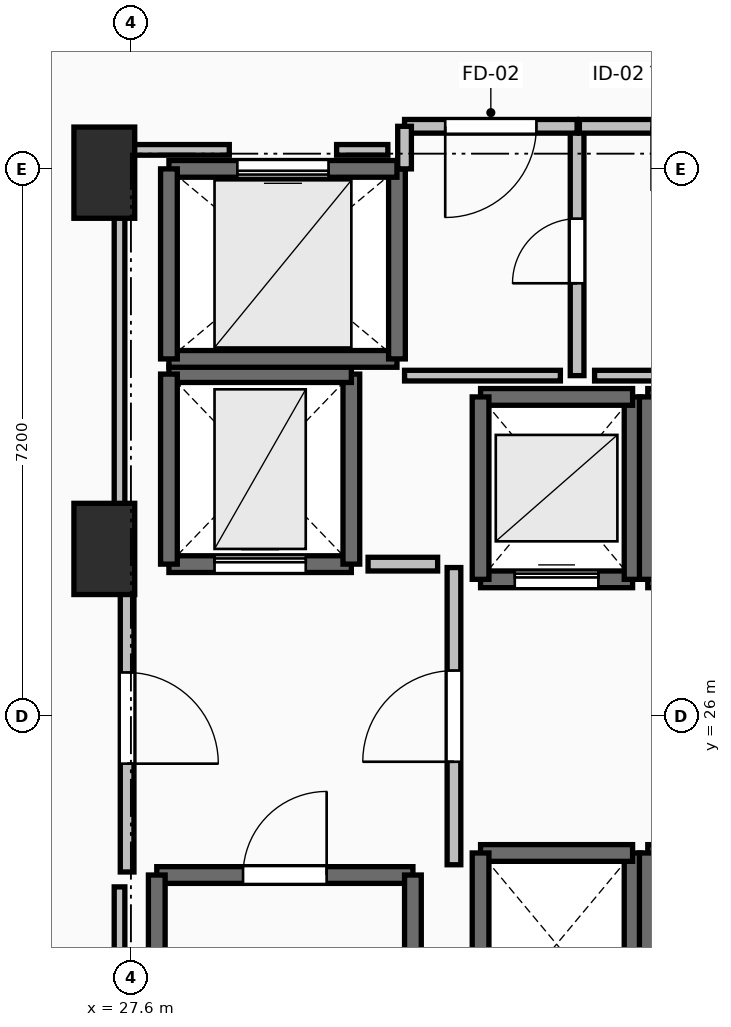
"""IFC4 building model, lengths in metres.
Left out: names, types, materials, properties, quantities, classifications, styles, units other than length and angle.
Written with IfcOpenShell. Run it as: python <this file> out.ifc"""

import sys

from ifc_helpers import new_model, si_unit, direction, frame, frame_2d, origin, origin_2d, place, context, subcontext, project, spatial, rectangle, extrude, element, fill, save


model = new_model("IFC4")
c1 = context("Model", 3, precision=1e-05, world=origin(), true_north=direction((0.0, 1.0)))
c2 = subcontext(c1, "Body", "Model", "MODEL_VIEW")
j1 = project(units=[si_unit("LENGTHUNIT", "METRE"), si_unit("PLANEANGLEUNIT", "RADIAN")], contexts=[c1])
p1 = place(None, origin())
s1 = spatial("IfcSite", under=j1, at=p1, CompositionType="ELEMENT")
p2 = place(p1, origin())
s2 = spatial("IfcBuilding", under=s1, at=p2, CompositionType="ELEMENT")
p3 = place(p2, frame((0.0, 0.0, 78.8)))
s3 = spatial("IfcBuildingStorey", under=s2, at=p3, CompositionType="ELEMENT", Elevation=78.8)
for number, where, z_axis, x_axis in (
    (1, (27.25, 28.2, 0.0), (0.0, 0.0, 1.0), (1.0, 0.0, 0.0)),
    (2, (27.25, 33.15, 0.0), (0.0, 0.0, 1.0), (1.0, 0.0, 0.0)),
):
    element("IfcColumn", number, at=place(p3, frame(where, z_axis=z_axis, x_axis=x_axis)), inside=s3, PredefinedType="PILASTER", context=c2, shape_type="SweptSolid", body=[
        extrude(rectangle(XDim=0.8, YDim=1.2, at=origin_2d()), origin(), (0.0, 0.0, 1.0), 3.5),
    ])
p4 = place(p3, frame((27.94, 23.91, 0.0), z_axis=(0.0, 0.0, 1.0), x_axis=(1.0, 0.0, 0.0)))
e3 = element("IfcWall", 3, at=p4, inside=s3, PredefinedType="SOLIDWALL", context=c2, shape_type="SweptSolid", body=[
    extrude(rectangle(XDim=3.37, YDim=0.22, at=frame_2d((1.685, 0.0))), origin(), (0.0, 0.0, 1.0), 3.24),
])
p5 = place(p4, frame((1.135, 0.0, 0.0)))
e4 = element("IfcOpeningElement", 4, at=p5, cuts=e3, PredefinedType="OPENING", context=c2, shape_type="SweptSolid", body=[
    extrude(rectangle(XDim=1.1, YDim=2.15, at=frame_2d((0.55, 1.075))), frame((0.0, 0.125, 0.0), z_axis=(0.0, -1.0, 0.0), x_axis=(1.0, 0.0, 0.0)), (0.0, 0.0, 1.0), 0.25),
])
for number, where, z_axis, x_axis in (
    (5, (31.31, 23.91, 0.0), (0.0, 0.0, 1.0), (0.0, -1.0, 0.0)),
    (6, (27.94, 16.49, 0.0), (0.0, 0.0, 1.0), (0.0, 1.0, 0.0)),
):
    element("IfcWall", number, at=place(p3, frame(where, z_axis=z_axis, x_axis=x_axis)), inside=s3, PredefinedType="SOLIDWALL", context=c2, shape_type="SweptSolid", body=[
        extrude(rectangle(XDim=7.42, YDim=0.22, at=frame_2d((3.71, 0.0))), origin(), (0.0, 0.0, 1.0), 3.24),
    ])
p6 = place(p3, frame((32.2, 27.8, 0.0), z_axis=(0.0, 0.0, 1.0), x_axis=(1.0, 0.0, 0.0)))
e7 = element("IfcWall", 7, at=p6, inside=s3, PredefinedType="SOLIDWALL", context=c2, shape_type="SweptSolid", body=[
    extrude(rectangle(XDim=2.0, YDim=0.22, at=frame_2d((1.0, 0.0))), origin(), (0.0, 0.0, 1.0), 3.24),
])
p7 = place(p6, frame((0.45, 0.0, 0.0)))
e8 = element("IfcOpeningElement", 8, at=p7, cuts=e7, PredefinedType="OPENING", context=c2, shape_type="SweptSolid", body=[
    extrude(rectangle(XDim=1.1, YDim=2.2, at=frame_2d((0.55, 1.1))), frame((0.0, 0.125, 0.0), z_axis=(0.0, -1.0, 0.0), x_axis=(1.0, 0.0, 0.0)), (0.0, 0.0, 1.0), 0.25),
])
p8 = place(p3, frame((34.2, 27.8, 0.0), z_axis=(0.0, 0.0, 1.0), x_axis=(0.0, 1.0, 0.0)))
e9 = element("IfcWall", 9, at=p8, inside=s3, PredefinedType="SOLIDWALL", context=c2, shape_type="SweptSolid", body=[
    extrude(rectangle(XDim=2.4, YDim=0.22, at=frame_2d((1.2, 0.0))), origin(), (0.0, 0.0, 1.0), 3.24),
])
p9 = place(p3, frame((34.2, 30.2, 0.0), z_axis=(0.0, 0.0, 1.0), x_axis=(-1.0, 0.0, 0.0)))
e10 = element("IfcWall", 10, at=p9, inside=s3, PredefinedType="SOLIDWALL", context=c2, shape_type="SweptSolid", body=[
    extrude(rectangle(XDim=2.0, YDim=0.22, at=frame_2d((1.0, 0.0))), origin(), (0.0, 0.0, 1.0), 3.24),
])
p10 = place(p3, frame((32.2, 30.2, 0.0), z_axis=(0.0, 0.0, 1.0), x_axis=(0.0, -1.0, 0.0)))
e11 = element("IfcWall", 11, at=p10, inside=s3, PredefinedType="SOLIDWALL", context=c2, shape_type="SweptSolid", body=[
    extrude(rectangle(XDim=2.4, YDim=0.22, at=frame_2d((1.2, 0.0))), origin(), (0.0, 0.0, 1.0), 3.24),
])
p11 = place(p3, frame((34.4, 27.8, 0.0), z_axis=(0.0, 0.0, 1.0), x_axis=(1.0, 0.0, 0.0)))
e12 = element("IfcWall", 12, at=p11, inside=s3, PredefinedType="SOLIDWALL", context=c2, shape_type="SweptSolid", body=[
    extrude(rectangle(XDim=2.0, YDim=0.22, at=frame_2d((1.0, 0.0))), origin(), (0.0, 0.0, 1.0), 3.24),
])
p12 = place(p11, frame((0.45, 0.0, 0.0)))
e13 = element("IfcOpeningElement", 13, at=p12, cuts=e12, PredefinedType="OPENING", context=c2, shape_type="SweptSolid", body=[
    extrude(rectangle(XDim=1.1, YDim=2.2, at=frame_2d((0.55, 1.1))), frame((0.0, 0.125, 0.0), z_axis=(0.0, -1.0, 0.0), x_axis=(1.0, 0.0, 0.0)), (0.0, 0.0, 1.0), 0.25),
])
p13 = place(p3, frame((36.4, 30.2, 0.0), z_axis=(0.0, 0.0, 1.0), x_axis=(-1.0, 0.0, 0.0)))
e14 = element("IfcWall", 14, at=p13, inside=s3, PredefinedType="SOLIDWALL", context=c2, shape_type="SweptSolid", body=[
    extrude(rectangle(XDim=2.0, YDim=0.22, at=frame_2d((1.0, 0.0))), origin(), (0.0, 0.0, 1.0), 3.24),
])
for number, where, z_axis, x_axis in (
    (15, (34.4, 30.2, 0.0), (0.0, 0.0, 1.0), (0.0, -1.0, 0.0)),
    (16, (34.2, 21.8, 0.0), (0.0, 0.0, 1.0), (0.0, 1.0, 0.0)),
):
    element("IfcWall", number, at=place(p3, frame(where, z_axis=z_axis, x_axis=x_axis)), inside=s3, PredefinedType="SOLIDWALL", context=c2, shape_type="SweptSolid", body=[
        extrude(rectangle(XDim=2.4, YDim=0.22, at=frame_2d((1.2, 0.0))), origin(), (0.0, 0.0, 1.0), 3.24),
    ])
p14 = place(p3, frame((34.2, 24.2, 0.0), z_axis=(0.0, 0.0, 1.0), x_axis=(-1.0, 0.0, 0.0)))
e17 = element("IfcWall", 17, at=p14, inside=s3, PredefinedType="SOLIDWALL", context=c2, shape_type="SweptSolid", body=[
    extrude(rectangle(XDim=2.0, YDim=0.22, at=frame_2d((1.0, 0.0))), origin(), (0.0, 0.0, 1.0), 3.24),
])
p15 = place(p3, frame((32.2, 24.2, 0.0), z_axis=(0.0, 0.0, 1.0), x_axis=(0.0, -1.0, 0.0)))
e18 = element("IfcWall", 18, at=p15, inside=s3, PredefinedType="SOLIDWALL", context=c2, shape_type="SweptSolid", body=[
    extrude(rectangle(XDim=2.4, YDim=0.22, at=frame_2d((1.2, 0.0))), origin(), (0.0, 0.0, 1.0), 3.24),
])
p16 = place(p3, frame((36.4, 24.2, 0.0), z_axis=(0.0, 0.0, 1.0), x_axis=(-1.0, 0.0, 0.0)))
e19 = element("IfcWall", 19, at=p16, inside=s3, PredefinedType="SOLIDWALL", context=c2, shape_type="SweptSolid", body=[
    extrude(rectangle(XDim=2.0, YDim=0.22, at=frame_2d((1.0, 0.0))), origin(), (0.0, 0.0, 1.0), 3.24),
])
p17 = place(p3, frame((34.4, 24.2, 0.0), z_axis=(0.0, 0.0, 1.0), x_axis=(0.0, -1.0, 0.0)))
e20 = element("IfcWall", 20, at=p17, inside=s3, PredefinedType="SOLIDWALL", context=c2, shape_type="SweptSolid", body=[
    extrude(rectangle(XDim=2.4, YDim=0.22, at=frame_2d((1.2, 0.0))), origin(), (0.0, 0.0, 1.0), 3.24),
])
p18 = place(p3, frame((28.1, 28.0, 0.0), z_axis=(0.0, 0.0, 1.0), x_axis=(1.0, 0.0, 0.0)))
e21 = element("IfcWall", 21, at=p18, inside=s3, PredefinedType="SHEAR", context=c2, shape_type="SweptSolid", body=[
    extrude(rectangle(XDim=2.4, YDim=0.22, at=frame_2d((1.2, 0.0))), origin(), (0.0, 0.0, 1.0), 3.24),
])
p19 = place(p18, frame((0.6, 0.0, 0.0)))
e22 = element("IfcOpeningElement", 22, at=p19, cuts=e21, PredefinedType="OPENING", context=c2, shape_type="SweptSolid", body=[
    extrude(rectangle(XDim=1.2, YDim=2.2, at=frame_2d((0.6, 1.1))), frame((0.0, 0.125, 0.0), z_axis=(0.0, -1.0, 0.0), x_axis=(1.0, 0.0, 0.0)), (0.0, 0.0, 1.0), 0.25),
])
p20 = place(p3, frame((30.5, 28.0, 0.0), z_axis=(0.0, 0.0, 1.0), x_axis=(0.0, 1.0, 0.0)))
e23 = element("IfcWall", 23, at=p20, inside=s3, PredefinedType="SHEAR", context=c2, shape_type="SweptSolid", body=[
    extrude(rectangle(XDim=2.5, YDim=0.22, at=frame_2d((1.25, 0.0))), origin(), (0.0, 0.0, 1.0), 3.24),
])
p21 = place(p3, frame((30.5, 30.5, 0.0), z_axis=(0.0, 0.0, 1.0), x_axis=(-1.0, 0.0, 0.0)))
e24 = element("IfcWall", 24, at=p21, inside=s3, PredefinedType="SHEAR", context=c2, shape_type="SweptSolid", body=[
    extrude(rectangle(XDim=2.4, YDim=0.22, at=frame_2d((1.2, 0.0))), origin(), (0.0, 0.0, 1.0), 3.24),
])
p22 = place(p3, frame((28.1, 30.5, 0.0), z_axis=(0.0, 0.0, 1.0), x_axis=(0.0, -1.0, 0.0)))
e25 = element("IfcWall", 25, at=p22, inside=s3, PredefinedType="SHEAR", context=c2, shape_type="SweptSolid", body=[
    extrude(rectangle(XDim=2.5, YDim=0.22, at=frame_2d((1.25, 0.0))), origin(), (0.0, 0.0, 1.0), 3.24),
])
p23 = place(p3, frame((28.1, 30.7, 0.0), z_axis=(0.0, 0.0, 1.0), x_axis=(1.0, 0.0, 0.0)))
e26 = element("IfcWall", 26, at=p23, inside=s3, PredefinedType="SOLIDWALL", context=c2, shape_type="SweptSolid", body=[
    extrude(rectangle(XDim=3.0, YDim=0.22, at=frame_2d((1.5, 0.0))), origin(), (0.0, 0.0, 1.0), 3.24),
])
p24 = place(p3, frame((31.1, 30.7, 0.0), z_axis=(0.0, 0.0, 1.0), x_axis=(0.0, 1.0, 0.0)))
e27 = element("IfcWall", 27, at=p24, inside=s3, PredefinedType="SOLIDWALL", context=c2, shape_type="SweptSolid", body=[
    extrude(rectangle(XDim=2.5, YDim=0.22, at=frame_2d((1.25, 0.0))), origin(), (0.0, 0.0, 1.0), 3.24),
])
p25 = place(p3, frame((31.1, 33.2, 0.0), z_axis=(0.0, 0.0, 1.0), x_axis=(-1.0, 0.0, 0.0)))
e28 = element("IfcWall", 28, at=p25, inside=s3, PredefinedType="SOLIDWALL", context=c2, shape_type="SweptSolid", body=[
    extrude(rectangle(XDim=3.0, YDim=0.22, at=frame_2d((1.5, 0.0))), origin(), (0.0, 0.0, 1.0), 3.24),
])
p26 = place(p25, frame((0.9, 0.0, 0.0)))
e29 = element("IfcOpeningElement", 29, at=p26, cuts=e28, PredefinedType="OPENING", context=c2, shape_type="SweptSolid", body=[
    extrude(rectangle(XDim=1.2, YDim=2.2, at=frame_2d((0.6, 1.1))), frame((0.0, 0.125, 0.0), z_axis=(0.0, -1.0, 0.0), x_axis=(1.0, 0.0, 0.0)), (0.0, 0.0, 1.0), 0.25),
])
p27 = place(p3, frame((28.1, 33.2, 0.0), z_axis=(0.0, 0.0, 1.0), x_axis=(0.0, -1.0, 0.0)))
e30 = element("IfcWall", 30, at=p27, inside=s3, PredefinedType="SOLIDWALL", context=c2, shape_type="SweptSolid", body=[
    extrude(rectangle(XDim=2.5, YDim=0.22, at=frame_2d((1.25, 0.0))), origin(), (0.0, 0.0, 1.0), 3.24),
])
p28 = place(p3, frame((31.85, 24.045, 0.0), z_axis=(0.0, 0.0, 1.0), x_axis=(0.0, 1.0, 0.0)))
e31 = element("IfcWall", 31, at=p28, inside=s3, PredefinedType="PARTITIONING", context=c2, shape_type="SweptSolid", body=[
    extrude(rectangle(XDim=3.91, YDim=0.18, at=frame_2d((1.955, 0.0))), origin(), (0.0, 0.0, 1.0), 3.24),
])
p29 = place(p28, frame((1.355, 0.0, 0.0)))
e32 = element("IfcOpeningElement", 32, at=p29, cuts=e31, PredefinedType="OPENING", context=c2, shape_type="SweptSolid", body=[
    extrude(rectangle(XDim=1.2, YDim=2.15, at=frame_2d((0.6, 1.075))), frame((0.0, 0.105, 0.0), z_axis=(0.0, -1.0, 0.0), x_axis=(1.0, 0.0, 0.0)), (0.0, 0.0, 1.0), 0.21),
])
p30 = place(p3, frame((27.55, 28.0, 0.0), z_axis=(0.0, 0.0, 1.0), x_axis=(0.0, -1.0, 0.0)))
e33 = element("IfcWall", 33, at=p30, inside=s3, PredefinedType="PARTITIONING", context=c2, shape_type="SweptSolid", body=[
    extrude(rectangle(XDim=4.05, YDim=0.18, at=frame_2d((2.025, 0.0))), origin(), (0.0, 0.0, 1.0), 3.24),
])
p31 = place(p30, frame((1.425, 0.0, 0.0)))
e34 = element("IfcOpeningElement", 34, at=p31, cuts=e33, PredefinedType="OPENING", context=c2, shape_type="SweptSolid", body=[
    extrude(rectangle(XDim=1.2, YDim=2.15, at=frame_2d((0.6, 1.075))), frame((0.0, 0.105, 0.0), z_axis=(0.0, -1.0, 0.0), x_axis=(1.0, 0.0, 0.0)), (0.0, 0.0, 1.0), 0.21),
])
p32 = place(p3, frame((33.47, 30.48, 0.0), z_axis=(0.0, 0.0, 1.0), x_axis=(0.0, 1.0, 0.0)))
e35 = element("IfcWall", 35, at=p32, inside=s3, PredefinedType="PARTITIONING", context=c2, shape_type="SweptSolid", body=[
    extrude(rectangle(XDim=3.28, YDim=0.18, at=frame_2d((1.64, 0.0))), origin(), (0.0, 0.0, 1.0), 3.24),
])
p33 = place(p32, frame((1.215, 0.0, 0.0)))
e36 = element("IfcOpeningElement", 36, at=p33, cuts=e35, PredefinedType="OPENING", context=c2, shape_type="SweptSolid", body=[
    extrude(rectangle(XDim=0.85, YDim=2.1, at=frame_2d((0.425, 1.05))), frame((0.0, 0.105, 0.0), z_axis=(0.0, -1.0, 0.0), x_axis=(1.0, 0.0, 0.0)), (0.0, 0.0, 1.0), 0.21),
])
p34 = place(p3, frame((33.47, 33.76, 0.0), z_axis=(0.0, 0.0, 1.0), x_axis=(-1.0, 0.0, 0.0)))
e37 = element("IfcWall", 37, at=p34, inside=s3, PredefinedType="PARTITIONING", context=c2, shape_type="SweptSolid", body=[
    extrude(rectangle(XDim=2.27, YDim=0.18, at=frame_2d((1.135, 0.0))), origin(), (0.0, 0.0, 1.0), 3.24),
])
p35 = place(p34, frame((0.535, 0.0, 0.0)))
e38 = element("IfcOpeningElement", 38, at=p35, cuts=e37, PredefinedType="OPENING", context=c2, shape_type="SweptSolid", body=[
    extrude(rectangle(XDim=1.2, YDim=2.15, at=frame_2d((0.6, 1.075))), frame((0.0, 0.105, 0.0), z_axis=(0.0, -1.0, 0.0), x_axis=(1.0, 0.0, 0.0)), (0.0, 0.0, 1.0), 0.21),
])
p36 = place(p3, frame((31.2, 33.76, 0.0), z_axis=(0.0, 0.0, 1.0), x_axis=(0.0, -1.0, 0.0)))
e39 = element("IfcWall", 39, at=p36, inside=s3, PredefinedType="PARTITIONING", context=c2, shape_type="SweptSolid", body=[
    extrude(rectangle(XDim=0.56, YDim=0.18, at=frame_2d((0.28, 0.0))), origin(), (0.0, 0.0, 1.0), 3.24),
])
p37 = place(p3, frame((36.25, 33.76, 0.0), z_axis=(0.0, 0.0, 1.0), x_axis=(-1.0, 0.0, 0.0)))
e40 = element("IfcWall", 40, at=p37, inside=s3, PredefinedType="PARTITIONING", context=c2, shape_type="SweptSolid", body=[
    extrude(rectangle(XDim=2.75, YDim=0.18, at=frame_2d((1.375, 0.0))), origin(), (0.0, 0.0, 1.0), 3.24),
])
p38 = place(p37, frame((0.95, 0.0, 0.0)))
e41 = element("IfcOpeningElement", 41, at=p38, cuts=e40, PredefinedType="OPENING", context=c2, shape_type="SweptSolid", body=[
    extrude(rectangle(XDim=0.85, YDim=2.1, at=frame_2d((0.425, 1.05))), frame((0.0, 0.105, 0.0), z_axis=(0.0, -1.0, 0.0), x_axis=(1.0, 0.0, 0.0)), (0.0, 0.0, 1.0), 0.21),
])
p39 = place(p3, frame((31.635, 28.0, 0.0), z_axis=(0.0, 0.0, 1.0), x_axis=(-1.0, 0.0, 0.0)))
e42 = element("IfcWall", 42, at=p39, inside=s3, PredefinedType="PARTITIONING", context=c2, shape_type="SweptSolid", body=[
    extrude(rectangle(XDim=0.915, YDim=0.18, at=frame_2d((0.458, 0.0))), origin(), (0.0, 0.0, 1.0), 3.24),
])
p40 = place(p3, frame((31.2, 30.48, 0.0), z_axis=(0.0, 0.0, 1.0), x_axis=(1.0, 0.0, 0.0)))
e43 = element("IfcWall", 43, at=p40, inside=s3, PredefinedType="PARTITIONING", context=c2, shape_type="SweptSolid", body=[
    extrude(rectangle(XDim=2.05, YDim=0.14, at=frame_2d((1.025, 0.0))), origin(), (0.0, 0.0, 1.0), 3.24),
])
p41 = place(p3, frame((33.7, 30.48, 0.0), z_axis=(0.0, 0.0, 1.0), x_axis=(1.0, 0.0, 0.0)))
e44 = element("IfcWall", 44, at=p41, inside=s3, PredefinedType="PARTITIONING", context=c2, shape_type="SweptSolid", body=[
    extrude(rectangle(XDim=2.33, YDim=0.14, at=frame_2d((1.165, 0.0))), origin(), (0.0, 0.0, 1.0), 2.432),
])
p42 = place(p3, frame((27.45, 16.24, 0.0), z_axis=(0.0, 0.0, 1.0), x_axis=(0.0, 1.0, 0.0)))
e45 = element("IfcWall", 45, at=p42, inside=s3, PredefinedType="PARTITIONING", context=c2, shape_type="SweptSolid", body=[
    extrude(rectangle(XDim=7.514, YDim=0.14, at=frame_2d((3.757, 0.0))), origin(), (0.0, 0.0, 1.0), 2.432),
])
p43 = place(p3, frame((27.45, 28.196, 0.0), z_axis=(0.0, 0.0, 1.0), x_axis=(0.0, 1.0, 0.0)))
e46 = element("IfcWall", 46, at=p43, inside=s3, PredefinedType="PARTITIONING", context=c2, shape_type="SweptSolid", body=[
    extrude(rectangle(XDim=5.254, YDim=0.14, at=frame_2d((2.627, 0.0))), origin(), (0.0, 0.0, 1.0), 2.432),
])
p44 = place(p3, frame((27.45, 33.45, 0.0), z_axis=(0.0, 0.0, 1.0), x_axis=(1.0, 0.0, 0.0)))
e47 = element("IfcWall", 47, at=p44, inside=s3, PredefinedType="PARTITIONING", context=c2, shape_type="SweptSolid", body=[
    extrude(rectangle(XDim=1.444, YDim=0.14, at=frame_2d((0.722, 0.0))), origin(), (0.0, 0.0, 1.0), 2.432),
])
p45 = place(p3, frame((30.306, 33.45, 0.0), z_axis=(0.0, 0.0, 1.0), x_axis=(1.0, 0.0, 0.0)))
e48 = element("IfcWall", 48, at=p45, inside=s3, PredefinedType="PARTITIONING", context=c2, shape_type="SweptSolid", body=[
    extrude(rectangle(XDim=0.674, YDim=0.14, at=frame_2d((0.337, 0.0))), origin(), (0.0, 0.0, 1.0), 3.24),
])
p46 = place(p5, origin())
e49 = element("IfcDoor", 49, at=p46, inside=s3, OperationType="SINGLE_SWING_RIGHT", PredefinedType="DOOR", context=c2, shape_type="SweptSolid", body=[
    extrude(rectangle(XDim=1.1, YDim=2.15, at=frame_2d((0.55, 1.075))), frame((0.0, 0.025, 0.0), z_axis=(0.0, -1.0, 0.0), x_axis=(1.0, 0.0, 0.0)), (0.0, 0.0, 1.0), 0.05),
])
fill(e4, e49)
p47 = place(p7, origin())
e50 = element("IfcDoor", 50, at=p47, inside=s3, OperationType="SLIDING_TO_LEFT", PredefinedType="DOOR", context=c2, shape_type="SweptSolid", body=[
    extrude(rectangle(XDim=1.1, YDim=2.2, at=frame_2d((0.55, 1.1))), frame((0.0, 0.025, 0.0), z_axis=(0.0, -1.0, 0.0), x_axis=(1.0, 0.0, 0.0)), (0.0, 0.0, 1.0), 0.05),
])
fill(e8, e50)
p48 = place(p19, origin())
e51 = element("IfcDoor", 51, at=p48, inside=s3, OperationType="SLIDING_TO_LEFT", PredefinedType="DOOR", context=c2, shape_type="SweptSolid", body=[
    extrude(rectangle(XDim=1.2, YDim=2.2, at=frame_2d((0.6, 1.1))), frame((0.0, 0.025, 0.0), z_axis=(0.0, -1.0, 0.0), x_axis=(1.0, 0.0, 0.0)), (0.0, 0.0, 1.0), 0.05),
])
fill(e22, e51)
p49 = place(p26, origin())
e52 = element("IfcDoor", 52, at=p49, inside=s3, OperationType="SLIDING_TO_LEFT", PredefinedType="DOOR", context=c2, shape_type="SweptSolid", body=[
    extrude(rectangle(XDim=1.2, YDim=2.2, at=frame_2d((0.6, 1.1))), frame((0.0, 0.025, 0.0), z_axis=(0.0, -1.0, 0.0), x_axis=(1.0, 0.0, 0.0)), (0.0, 0.0, 1.0), 0.05),
])
fill(e29, e52)
p50 = place(p29, origin())
e53 = element("IfcDoor", 53, at=p50, inside=s3, OperationType="SINGLE_SWING_LEFT", PredefinedType="DOOR", context=c2, shape_type="SweptSolid", body=[
    extrude(rectangle(XDim=1.2, YDim=2.15, at=frame_2d((0.6, 1.075))), frame((0.0, 0.025, 0.0), z_axis=(0.0, -1.0, 0.0), x_axis=(1.0, 0.0, 0.0)), (0.0, 0.0, 1.0), 0.05),
])
fill(e32, e53)
p51 = place(p31, origin())
e54 = element("IfcDoor", 54, at=p51, inside=s3, OperationType="SINGLE_SWING_RIGHT", PredefinedType="DOOR", context=c2, shape_type="SweptSolid", body=[
    extrude(rectangle(XDim=1.2, YDim=2.15, at=frame_2d((0.6, 1.075))), frame((0.0, 0.025, 0.0), z_axis=(0.0, -1.0, 0.0), x_axis=(1.0, 0.0, 0.0)), (0.0, 0.0, 1.0), 0.05),
])
fill(e34, e54)
p52 = place(p33, origin())
e55 = element("IfcDoor", 55, at=p52, inside=s3, OperationType="SINGLE_SWING_LEFT", PredefinedType="DOOR", context=c2, shape_type="SweptSolid", body=[
    extrude(rectangle(XDim=0.85, YDim=2.1, at=frame_2d((0.425, 1.05))), frame((0.0, 0.025, 0.0), z_axis=(0.0, -1.0, 0.0), x_axis=(1.0, 0.0, 0.0)), (0.0, 0.0, 1.0), 0.05),
])
fill(e36, e55)
p53 = place(p35, origin())
e56 = element("IfcDoor", 56, at=p53, inside=s3, OperationType="SINGLE_SWING_RIGHT", PredefinedType="DOOR", context=c2, shape_type="SweptSolid", body=[
    extrude(rectangle(XDim=1.2, YDim=2.15, at=frame_2d((0.6, 1.075))), frame((0.0, 0.025, 0.0), z_axis=(0.0, -1.0, 0.0), x_axis=(1.0, 0.0, 0.0)), (0.0, 0.0, 1.0), 0.05),
])
fill(e38, e56)
save(model, sys.argv[1])
